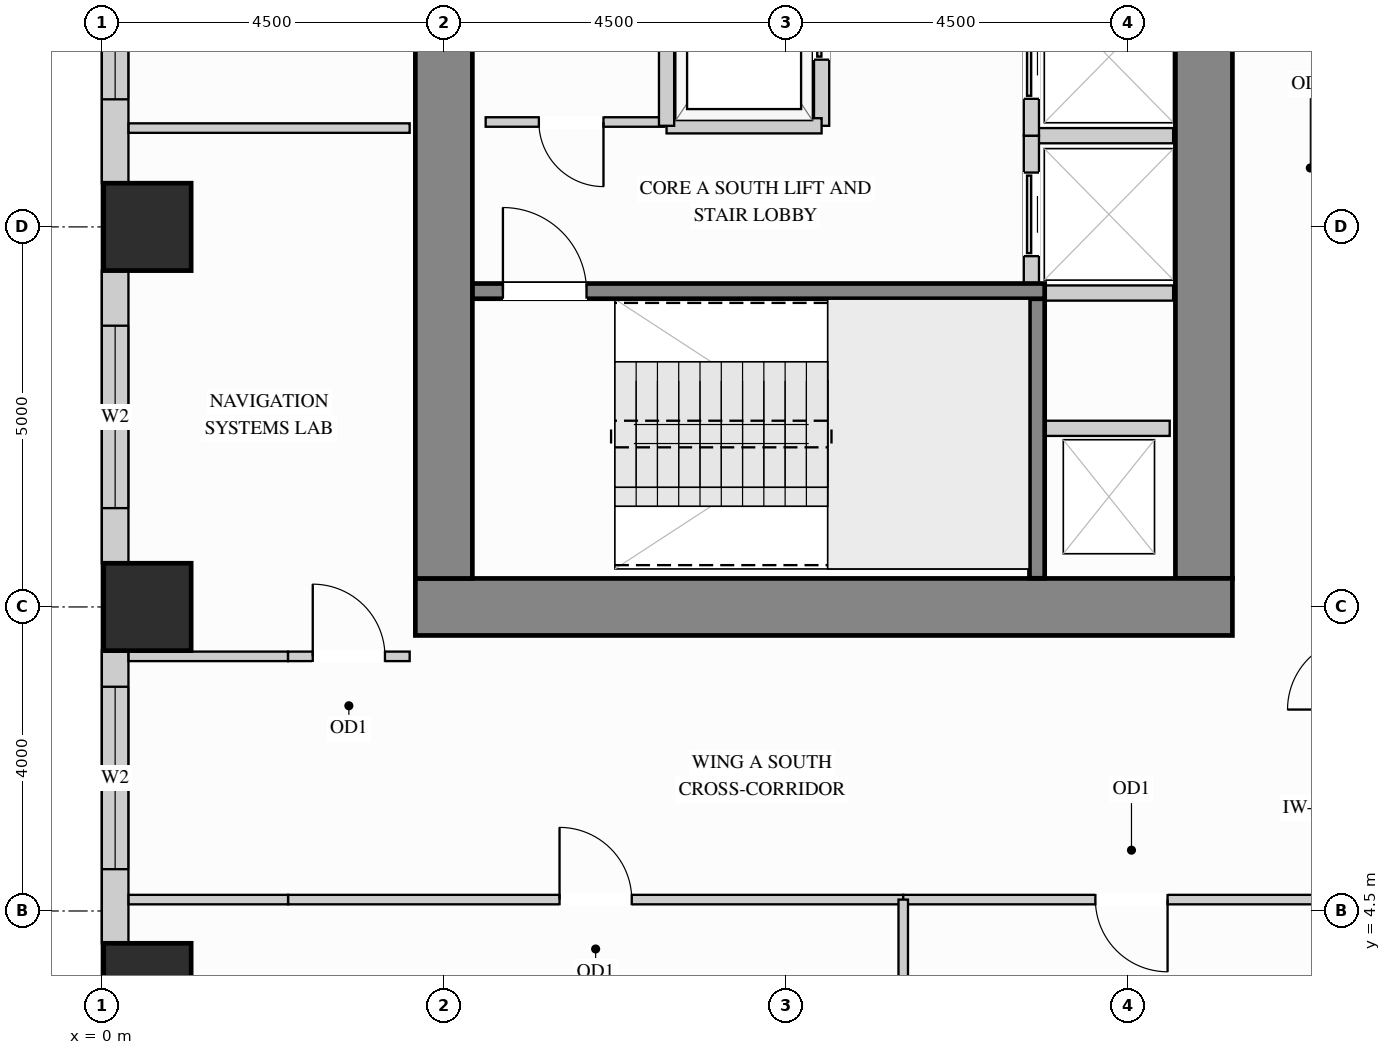
"""IFC4 building model, lengths in metres.
Left out: names, types, materials, properties, quantities, classifications, styles, units other than length and angle.
Written with IfcOpenShell. Run it as: python <this file> out.ifc"""

import sys

from ifc_helpers import new_model, si_unit, direction, frame, frame_2d, origin, origin_2d, place, context, subcontext, project, spatial, rectangle, extrude, source, transform, mapped, element, fill, save


model = new_model("IFC4")
c1 = context("Model", 3, precision=1e-05, world=origin(), true_north=direction((0.0, 1.0)))
c2 = subcontext(c1, "Body", "Model", "MODEL_VIEW")
j1 = project(units=[si_unit("LENGTHUNIT", "METRE"), si_unit("PLANEANGLEUNIT", "RADIAN")], contexts=[c1])
p1 = place(None, origin())
s1 = spatial("IfcSite", under=j1, at=p1, CompositionType="ELEMENT")
p2 = place(p1, origin())
s2 = spatial("IfcBuilding", under=s1, at=p2, CompositionType="ELEMENT")
p3 = place(p2, frame((0.0, 0.0, 102.6)))
s3 = spatial("IfcBuildingStorey", under=s2, at=p3, CompositionType="ELEMENT", Elevation=102.6)
m1 = source(origin(), c2, "Body", "SweptSolid", [
    extrude(rectangle(XDim=1.15, YDim=1.15, at=origin_2d()), origin(), (0.0, 0.0, 1.0), 3.38),
])
for number, where, z_axis, x_axis in (
    (1, (0.6, 13.5, 0.0), (0.0, 0.0, 1.0), (1.0, 0.0, 0.0)),
    (2, (0.6, 3.5, 0.0), (0.0, 0.0, 1.0), (1.0, 0.0, 0.0)),
    (3, (0.6, 8.5, 0.0), (0.0, 0.0, 1.0), (1.0, 0.0, 0.0)),
):
    element("IfcColumn", number, at=place(p3, frame(where, z_axis=z_axis, x_axis=x_axis)), inside=s3, PredefinedType="COLUMN", context=c2, shape_type="MappedRepresentation", body=[
        mapped(m1, transform((0.0, 0.0, 0.0), x_axis=(1.0, 0.0, 0.0), y_axis=(0.0, 1.0, 0.0), z_axis=(0.0, 0.0, 1.0))),
    ])
m2 = source(origin(), c2, "Body", "SweptSolid", [
    extrude(rectangle(XDim=9.945, YDim=0.75, at=frame_2d((4.973, 0.0))), origin(), (0.0, 0.0, 1.0), 3.38),
])
p4 = place(p3, frame((14.5, 8.875, 0.0), z_axis=(0.0, 0.0, 1.0), x_axis=(0.0, 1.0, 0.0)))
e4 = element("IfcWall", 4, at=p4, inside=s3, PredefinedType="SHEAR", context=c2, shape_type="MappedRepresentation", body=[
    mapped(m2, transform((0.0, 0.0, 0.0), x_axis=(1.0, 0.0, 0.0), y_axis=(0.0, 1.0, 0.0), z_axis=(0.0, 0.0, 1.0))),
])
m3 = source(origin(), c2, "Body", "SweptSolid", [
    extrude(rectangle(XDim=10.75, YDim=0.75, at=frame_2d((5.375, 0.0))), origin(), (0.0, 0.0, 1.0), 3.38),
])
p5 = place(p3, frame((4.125, 8.5, 0.0), z_axis=(0.0, 0.0, 1.0), x_axis=(1.0, 0.0, 0.0)))
e5 = element("IfcWall", 5, at=p5, inside=s3, PredefinedType="SHEAR", context=c2, shape_type="MappedRepresentation", body=[
    mapped(m3, transform((0.0, 0.0, 0.0), x_axis=(1.0, 0.0, 0.0), y_axis=(0.0, 1.0, 0.0), z_axis=(0.0, 0.0, 1.0))),
])
m4 = source(origin(), c2, "Body", "SweptSolid", [
    extrude(rectangle(XDim=20.25, YDim=0.75, at=frame_2d((10.125, 0.0))), origin(), (0.0, 0.0, 1.0), 3.38),
])
p6 = place(p3, frame((4.5, 8.875, 0.0), z_axis=(0.0, 0.0, 1.0), x_axis=(0.0, 1.0, 0.0)))
e6 = element("IfcWall", 6, at=p6, inside=s3, PredefinedType="SHEAR", context=c2, shape_type="MappedRepresentation", body=[
    mapped(m4, transform((0.0, 0.0, 0.0), x_axis=(1.0, 0.0, 0.0), y_axis=(0.0, 1.0, 0.0), z_axis=(0.0, 0.0, 1.0))),
])
p7 = place(p3, frame((0.175, 17.427, 0.0), z_axis=(0.0, 0.0, 1.0), x_axis=(0.0, -1.0, 0.0)))
e7 = element("IfcWall", 7, at=p7, inside=s3, PredefinedType="SOLIDWALL", context=c2, shape_type="SweptSolid", body=[
    extrude(rectangle(XDim=3.354, YDim=0.35, at=frame_2d((1.677, 0.0))), origin(), (0.0, 0.0, 1.0), 3.365),
])
p8 = place(p7, frame((0.448, 0.0, 0.78)))
e8 = element("IfcOpeningElement", 8, at=p8, cuts=e7, PredefinedType="OPENING", context=c2, shape_type="SweptSolid", body=[
    extrude(rectangle(XDim=1.8, YDim=2.1, at=frame_2d((0.9, 1.05))), frame((0.0, 0.185, 0.0), z_axis=(0.0, -1.0, 0.0), x_axis=(1.0, 0.0, 0.0)), (0.0, 0.0, 1.0), 0.37),
])
p9 = place(p3, frame((0.175, 12.927, 0.0), z_axis=(0.0, 0.0, 1.0), x_axis=(0.0, -1.0, 0.0)))
e9 = element("IfcWall", 9, at=p9, inside=s3, PredefinedType="SOLIDWALL", context=c2, shape_type="SweptSolid", body=[
    extrude(rectangle(XDim=3.854, YDim=0.35, at=frame_2d((1.927, 0.0))), origin(), (0.0, 0.0, 1.0), 3.365),
])
p10 = place(p9, frame((0.727, 0.0, 0.78)))
e10 = element("IfcOpeningElement", 10, at=p10, cuts=e9, PredefinedType="OPENING", context=c2, shape_type="SweptSolid", body=[
    extrude(rectangle(XDim=2.4, YDim=2.1, at=frame_2d((1.2, 1.05))), frame((0.0, 0.185, 0.0), z_axis=(0.0, -1.0, 0.0), x_axis=(1.0, 0.0, 0.0)), (0.0, 0.0, 1.0), 0.37),
])
p11 = place(p3, frame((0.175, 7.927, 0.0), z_axis=(0.0, 0.0, 1.0), x_axis=(0.0, -1.0, 0.0)))
e11 = element("IfcWall", 11, at=p11, inside=s3, PredefinedType="SOLIDWALL", context=c2, shape_type="SweptSolid", body=[
    extrude(rectangle(XDim=3.854, YDim=0.35, at=frame_2d((1.927, 0.0))), origin(), (0.0, 0.0, 1.0), 3.365),
])
p12 = place(p11, frame((0.477, 0.0, 0.78)))
e12 = element("IfcOpeningElement", 12, at=p12, cuts=e11, PredefinedType="OPENING", context=c2, shape_type="SweptSolid", body=[
    extrude(rectangle(XDim=2.4, YDim=2.1, at=frame_2d((1.2, 1.05))), frame((0.0, 0.185, 0.0), z_axis=(0.0, -1.0, 0.0), x_axis=(1.0, 0.0, 0.0)), (0.0, 0.0, 1.0), 0.37),
])
p13 = place(p3, frame((5.05, 14.88, 0.0), z_axis=(0.0, 0.0, 1.0), x_axis=(1.0, 0.0, 0.0)))
e13 = element("IfcWall", 13, at=p13, inside=s3, PredefinedType="PARTITIONING", context=c2, shape_type="SweptSolid", body=[
    extrude(rectangle(XDim=2.35, YDim=0.125, at=frame_2d((1.175, 0.0))), origin(), (0.0, 0.0, 1.0), 3.365),
])
p14 = place(p13, frame((0.7, 0.0, 0.0)))
e14 = element("IfcOpeningElement", 14, at=p14, cuts=e13, PredefinedType="OPENING", context=c2, shape_type="SweptSolid", body=[
    extrude(rectangle(XDim=0.85, YDim=2.1, at=frame_2d((0.425, 1.05))), frame((0.0, 0.073, 0.0), z_axis=(0.0, -1.0, 0.0), x_axis=(1.0, 0.0, 0.0)), (0.0, 0.0, 1.0), 0.145),
])
m5 = source(origin(), c2, "Body", "SweptSolid", [
    extrude(rectangle(XDim=2.098, YDim=0.125, at=frame_2d((1.049, 0.0))), origin(), (0.0, 0.0, 1.0), 3.365),
])
p15 = place(p3, frame((0.352, 7.85, 0.0), z_axis=(0.0, 0.0, 1.0), x_axis=(1.0, 0.0, 0.0)))
e15 = element("IfcWall", 15, at=p15, inside=s3, PredefinedType="PARTITIONING", context=c2, shape_type="MappedRepresentation", body=[
    mapped(m5, transform((0.0, 0.0, 0.0), x_axis=(1.0, 0.0, 0.0), y_axis=(0.0, 1.0, 0.0), z_axis=(0.0, 0.0, 1.0))),
])
p16 = place(p3, frame((2.45, 7.85, 0.0), z_axis=(0.0, 0.0, 1.0), x_axis=(1.0, 0.0, 0.0)))
e16 = element("IfcWall", 16, at=p16, inside=s3, PredefinedType="PARTITIONING", context=c2, shape_type="SweptSolid", body=[
    extrude(rectangle(XDim=1.6, YDim=0.125, at=frame_2d((0.8, 0.0))), origin(), (0.0, 0.0, 1.0), 3.365),
])
p17 = place(p16, frame((0.325, 0.0, 0.0)))
e17 = element("IfcOpeningElement", 17, at=p17, cuts=e16, PredefinedType="OPENING", context=c2, shape_type="SweptSolid", body=[
    extrude(rectangle(XDim=0.95, YDim=2.15, at=frame_2d((0.475, 1.075))), frame((0.0, 0.073, 0.0), z_axis=(0.0, -1.0, 0.0), x_axis=(1.0, 0.0, 0.0)), (0.0, 0.0, 1.0), 0.145),
])
p18 = place(p3, frame((2.45, 4.65, 0.0), z_axis=(0.0, 0.0, 1.0), x_axis=(1.0, 0.0, 0.0)))
e18 = element("IfcWall", 18, at=p18, inside=s3, PredefinedType="PARTITIONING", context=c2, shape_type="SweptSolid", body=[
    extrude(rectangle(XDim=8.094, YDim=0.125, at=frame_2d((4.047, 0.0))), origin(), (0.0, 0.0, 1.0), 2.828),
])
p19 = place(p18, frame((3.572, 0.0, 0.0)))
e19 = element("IfcOpeningElement", 19, at=p19, cuts=e18, PredefinedType="OPENING", context=c2, shape_type="SweptSolid", body=[
    extrude(rectangle(XDim=0.95, YDim=2.15, at=frame_2d((0.475, 1.075))), frame((0.0, 0.073, 0.0), z_axis=(0.0, -1.0, 0.0), x_axis=(1.0, 0.0, 0.0)), (0.0, 0.0, 1.0), 0.145),
])
p20 = place(p3, frame((10.544, 4.65, 0.0), z_axis=(0.0, 0.0, 1.0), x_axis=(1.0, 0.0, 0.0)))
e20 = element("IfcWall", 20, at=p20, inside=s3, PredefinedType="PARTITIONING", context=c2, shape_type="SweptSolid", body=[
    extrude(rectangle(XDim=6.006, YDim=0.125, at=frame_2d((3.003, 0.0))), origin(), (0.0, 0.0, 1.0), 2.828),
])
p21 = place(p20, frame((2.528, 0.0, 0.0)))
e21 = element("IfcOpeningElement", 21, at=p21, cuts=e20, PredefinedType="OPENING", context=c2, shape_type="SweptSolid", body=[
    extrude(rectangle(XDim=0.95, YDim=2.15, at=frame_2d((0.475, 1.075))), frame((0.0, 0.073, 0.0), z_axis=(0.0, -1.0, 0.0), x_axis=(1.0, 0.0, 0.0)), (0.0, 0.0, 1.0), 0.145),
])
m6 = source(origin(), c2, "Body", "SweptSolid", [
    extrude(rectangle(XDim=2.098, YDim=0.125, at=frame_2d((1.049, 0.0))), origin(), (0.0, 0.0, 1.0), 2.828),
])
p22 = place(p3, frame((0.352, 4.65, 0.0), z_axis=(0.0, 0.0, 1.0), x_axis=(1.0, 0.0, 0.0)))
e22 = element("IfcWall", 22, at=p22, inside=s3, PredefinedType="PARTITIONING", context=c2, shape_type="MappedRepresentation", body=[
    mapped(m6, transform((0.0, 0.0, 0.0), x_axis=(1.0, 0.0, 0.0), y_axis=(0.0, 1.0, 0.0), z_axis=(0.0, 0.0, 1.0))),
])
m7 = source(origin(), c2, "Body", "SweptSolid", [
    extrude(rectangle(XDim=4.298, YDim=0.125, at=frame_2d((2.149, 0.0))), origin(), (0.0, 0.0, 1.0), 3.365),
])
p23 = place(p3, frame((10.544, 0.352, 0.0), z_axis=(0.0, 0.0, 1.0), x_axis=(0.0, 1.0, 0.0)))
e23 = element("IfcWall", 23, at=p23, inside=s3, PredefinedType="PARTITIONING", context=c2, shape_type="MappedRepresentation", body=[
    mapped(m7, transform((0.0, 0.0, 0.0), x_axis=(1.0, 0.0, 0.0), y_axis=(0.0, 1.0, 0.0), z_axis=(0.0, 0.0, 1.0))),
])
m8 = source(origin(), c2, "Body", "SweptSolid", [
    extrude(rectangle(XDim=3.698, YDim=0.125, at=frame_2d((1.849, 0.0))), origin(), (0.0, 0.0, 1.0), 3.365),
])
p24 = place(p3, frame((0.352, 14.8, 0.0), z_axis=(0.0, 0.0, 1.0), x_axis=(1.0, 0.0, 0.0)))
e24 = element("IfcWall", 24, at=p24, inside=s3, PredefinedType="PARTITIONING", context=c2, shape_type="MappedRepresentation", body=[
    mapped(m8, transform((0.0, 0.0, 0.0), x_axis=(1.0, 0.0, 0.0), y_axis=(0.0, 1.0, 0.0), z_axis=(0.0, 0.0, 1.0))),
])
m9 = source(origin(), c2, "Body", "SweptSolid", [
    extrude(rectangle(XDim=1.63, YDim=0.2, at=frame_2d((0.815, 0.0))), origin(), (0.0, 0.0, 1.0), 3.365),
])
p25 = place(p3, frame((12.42, 10.85, 0.0), z_axis=(0.0, 0.0, 1.0), x_axis=(1.0, 0.0, 0.0)))
e25 = element("IfcWall", 25, at=p25, inside=s3, PredefinedType="PARTITIONING", context=c2, shape_type="MappedRepresentation", body=[
    mapped(m9, transform((0.0, 0.0, 0.0), x_axis=(1.0, 0.0, 0.0), y_axis=(0.0, 1.0, 0.0), z_axis=(0.0, 0.0, 1.0))),
])
m10 = source(origin(), c2, "Body", "SweptSolid", [
    extrude(rectangle(XDim=1.865, YDim=0.2, at=frame_2d((0.933, 0.0))), origin(), (0.0, 0.0, 1.0), 3.365),
])
for number, where, z_axis, x_axis in (
    (26, (12.23, 14.7, 0.0), (0.0, 0.0, 1.0), (1.0, 0.0, 0.0)),
    (27, (12.23, 12.63, 0.0), (0.0, 0.0, 1.0), (1.0, 0.0, 0.0)),
):
    element("IfcWall", number, at=place(p3, frame(where, z_axis=z_axis, x_axis=x_axis)), inside=s3, PredefinedType="PARTITIONING", context=c2, shape_type="MappedRepresentation", body=[
        mapped(m10, transform((0.0, 0.0, 0.0), x_axis=(1.0, 0.0, 0.0), y_axis=(0.0, 1.0, 0.0), z_axis=(0.0, 0.0, 1.0))),
    ])
p26 = place(p3, frame((12.23, 12.63, 0.0), z_axis=(0.0, 0.0, 1.0), x_axis=(0.0, 1.0, 0.0)))
e28 = element("IfcWall", 28, at=p26, inside=s3, PredefinedType="PARTITIONING", context=c2, shape_type="SweptSolid", body=[
    extrude(rectangle(XDim=2.07, YDim=0.2, at=frame_2d((1.035, 0.0))), origin(), (0.0, 0.0, 1.0), 3.365),
])
p27 = place(p26, frame((0.485, 0.0, 0.0)))
e29 = element("IfcOpeningElement", 29, at=p27, cuts=e28, PredefinedType="OPENING", context=c2, shape_type="SweptSolid", body=[
    extrude(rectangle(XDim=1.1, YDim=2.2, at=frame_2d((0.55, 1.1))), frame((0.0, 0.11, 0.0), z_axis=(0.0, -1.0, 0.0), x_axis=(1.0, 0.0, 0.0)), (0.0, 0.0, 1.0), 0.22),
])
p28 = place(p3, frame((12.23, 14.7, 0.0), z_axis=(0.0, 0.0, 1.0), x_axis=(0.0, 1.0, 0.0)))
e30 = element("IfcWall", 30, at=p28, inside=s3, PredefinedType="PARTITIONING", context=c2, shape_type="SweptSolid", body=[
    extrude(rectangle(XDim=2.07, YDim=0.2, at=frame_2d((1.035, 0.0))), origin(), (0.0, 0.0, 1.0), 3.365),
])
p29 = place(p28, frame((0.485, 0.0, 0.0)))
e31 = element("IfcOpeningElement", 31, at=p29, cuts=e30, PredefinedType="OPENING", context=c2, shape_type="SweptSolid", body=[
    extrude(rectangle(XDim=1.1, YDim=2.2, at=frame_2d((0.55, 1.1))), frame((0.0, 0.11, 0.0), z_axis=(0.0, -1.0, 0.0), x_axis=(1.0, 0.0, 0.0)), (0.0, 0.0, 1.0), 0.22),
])
p30 = place(p3, frame((9.47, 14.83, 0.0), z_axis=(0.0, 0.0, 1.0), x_axis=(0.0, 1.0, 0.0)))
e32 = element("IfcWall", 32, at=p30, inside=s3, PredefinedType="PARTITIONING", context=c2, shape_type="SweptSolid", body=[
    extrude(rectangle(XDim=2.84, YDim=0.2, at=frame_2d((1.42, 0.0))), origin(), (0.0, 0.0, 1.0), 3.365),
])
p31 = place(p30, frame((0.87, 0.0, 0.0)))
e33 = element("IfcOpeningElement", 33, at=p31, cuts=e32, PredefinedType="OPENING", context=c2, shape_type="SweptSolid", body=[
    extrude(rectangle(XDim=1.1, YDim=2.2, at=frame_2d((0.55, 1.1))), frame((0.0, 0.11, 0.0), z_axis=(0.0, -1.0, 0.0), x_axis=(1.0, 0.0, 0.0)), (0.0, 0.0, 1.0), 0.22),
])
m11 = source(origin(), c2, "Body", "SweptSolid", [
    extrude(rectangle(XDim=2.04, YDim=0.2, at=frame_2d((1.02, 0.0))), origin(), (0.0, 0.0, 1.0), 3.365),
])
p32 = place(p3, frame((7.43, 14.83, 0.0), z_axis=(0.0, 0.0, 1.0), x_axis=(1.0, 0.0, 0.0)))
e34 = element("IfcWall", 34, at=p32, inside=s3, PredefinedType="PARTITIONING", context=c2, shape_type="MappedRepresentation", body=[
    mapped(m11, transform((0.0, 0.0, 0.0), x_axis=(1.0, 0.0, 0.0), y_axis=(0.0, 1.0, 0.0), z_axis=(0.0, 0.0, 1.0))),
])
m12 = source(origin(), c2, "Body", "SweptSolid", [
    extrude(rectangle(XDim=2.84, YDim=0.2, at=frame_2d((1.42, 0.0))), origin(), (0.0, 0.0, 1.0), 3.365),
])
p33 = place(p3, frame((7.43, 14.83, 0.0), z_axis=(0.0, 0.0, 1.0), x_axis=(0.0, 1.0, 0.0)))
e35 = element("IfcWall", 35, at=p33, inside=s3, PredefinedType="PARTITIONING", context=c2, shape_type="MappedRepresentation", body=[
    mapped(m12, transform((0.0, 0.0, 0.0), x_axis=(1.0, 0.0, 0.0), y_axis=(0.0, 1.0, 0.0), z_axis=(0.0, 0.0, 1.0))),
])
m13 = source(origin(), c2, "Body", "SweptSolid", [
    extrude(rectangle(XDim=3.678, YDim=0.2, at=frame_2d((1.839, 0.0))), origin(), (0.0, 0.0, 1.0), 3.38),
])
p34 = place(p3, frame((12.305, 8.877, 0.0), z_axis=(0.0, 0.0, 1.0), x_axis=(0.0, 1.0, 0.0)))
e36 = element("IfcWall", 36, at=p34, inside=s3, PredefinedType="SHEAR", context=c2, shape_type="MappedRepresentation", body=[
    mapped(m13, transform((0.0, 0.0, 0.0), x_axis=(1.0, 0.0, 0.0), y_axis=(0.0, 1.0, 0.0), z_axis=(0.0, 0.0, 1.0))),
])
p35 = place(p3, frame((4.877, 12.655, 0.0), z_axis=(0.0, 0.0, 1.0), x_axis=(1.0, 0.0, 0.0)))
e37 = element("IfcWall", 37, at=p35, inside=s3, PredefinedType="SHEAR", context=c2, shape_type="SweptSolid", body=[
    extrude(rectangle(XDim=7.528, YDim=0.2, at=frame_2d((3.764, 0.0))), origin(), (0.0, 0.0, 1.0), 3.38),
])
p36 = place(p35, frame((0.4, 0.0, 0.0)))
e38 = element("IfcOpeningElement", 38, at=p36, cuts=e37, PredefinedType="OPENING", context=c2, shape_type="SweptSolid", body=[
    extrude(rectangle(XDim=1.1, YDim=2.15, at=frame_2d((0.55, 1.075))), frame((0.0, 0.11, 0.0), z_axis=(0.0, -1.0, 0.0), x_axis=(1.0, 0.0, 0.0)), (0.0, 0.0, 1.0), 0.22),
])
m14 = source(origin(), c2, "Body", "SweptSolid", [
    extrude(rectangle(XDim=1.1, YDim=2.2, at=frame_2d((0.55, 1.1))), frame((0.0, 0.025, 0.0), z_axis=(0.0, -1.0, 0.0), x_axis=(1.0, 0.0, 0.0)), (0.0, 0.0, 1.0), 0.05),
])
p37 = place(p27, origin())
e39 = element("IfcDoor", 39, at=p37, inside=s3, OperationType="SLIDING_TO_LEFT", PredefinedType="DOOR", context=c2, shape_type="MappedRepresentation", body=[
    mapped(m14, transform((0.0, 0.0, 0.0), x_axis=(1.0, 0.0, 0.0), y_axis=(0.0, 1.0, 0.0), z_axis=(0.0, 0.0, 1.0))),
])
fill(e29, e39)
p38 = place(p29, origin())
e40 = element("IfcDoor", 40, at=p38, inside=s3, OperationType="SLIDING_TO_LEFT", PredefinedType="DOOR", context=c2, shape_type="MappedRepresentation", body=[
    mapped(m14, transform((0.0, 0.0, 0.0), x_axis=(1.0, 0.0, 0.0), y_axis=(0.0, 1.0, 0.0), z_axis=(0.0, 0.0, 1.0))),
])
fill(e31, e40)
p39 = place(p31, origin())
e41 = element("IfcDoor", 41, at=p39, inside=s3, OperationType="SLIDING_TO_LEFT", PredefinedType="DOOR", context=c2, shape_type="MappedRepresentation", body=[
    mapped(m14, transform((0.0, 0.0, 0.0), x_axis=(1.0, 0.0, 0.0), y_axis=(0.0, 1.0, 0.0), z_axis=(0.0, 0.0, 1.0))),
])
fill(e33, e41)
m15 = source(origin(), c2, "Body", "SweptSolid", [
    extrude(rectangle(XDim=0.95, YDim=2.15, at=frame_2d((0.475, 1.075))), frame((0.0, 0.025, 0.0), z_axis=(0.0, -1.0, 0.0), x_axis=(1.0, 0.0, 0.0)), (0.0, 0.0, 1.0), 0.05),
])
p40 = place(p19, origin())
e42 = element("IfcDoor", 42, at=p40, inside=s3, OperationType="SINGLE_SWING_LEFT", PredefinedType="DOOR", context=c2, shape_type="MappedRepresentation", body=[
    mapped(m15, transform((0.0, 0.0, 0.0), x_axis=(1.0, 0.0, 0.0), y_axis=(0.0, 1.0, 0.0), z_axis=(0.0, 0.0, 1.0))),
])
fill(e19, e42)
p41 = place(p21, origin())
e43 = element("IfcDoor", 43, at=p41, inside=s3, OperationType="SINGLE_SWING_RIGHT", PredefinedType="DOOR", context=c2, shape_type="MappedRepresentation", body=[
    mapped(m15, transform((0.0, 0.0, 0.0), x_axis=(1.0, 0.0, 0.0), y_axis=(0.0, 1.0, 0.0), z_axis=(0.0, 0.0, 1.0))),
])
fill(e21, e43)
p42 = place(p17, origin())
e44 = element("IfcDoor", 44, at=p42, inside=s3, OperationType="SINGLE_SWING_LEFT", PredefinedType="DOOR", context=c2, shape_type="MappedRepresentation", body=[
    mapped(m15, transform((0.0, 0.0, 0.0), x_axis=(1.0, 0.0, 0.0), y_axis=(0.0, 1.0, 0.0), z_axis=(0.0, 0.0, 1.0))),
])
fill(e17, e44)
m16 = source(origin(), c2, "Body", "SweptSolid", [
    extrude(rectangle(XDim=0.85, YDim=2.1, at=frame_2d((0.425, 1.05))), frame((0.0, 0.025, 0.0), z_axis=(0.0, -1.0, 0.0), x_axis=(1.0, 0.0, 0.0)), (0.0, 0.0, 1.0), 0.05),
])
p43 = place(p14, origin())
e45 = element("IfcDoor", 45, at=p43, inside=s3, OperationType="SINGLE_SWING_RIGHT", PredefinedType="DOOR", context=c2, shape_type="MappedRepresentation", body=[
    mapped(m16, transform((0.0, 0.0, 0.0), x_axis=(1.0, 0.0, 0.0), y_axis=(0.0, 1.0, 0.0), z_axis=(0.0, 0.0, 1.0))),
])
fill(e14, e45)
m17 = source(origin(), c2, "Body", "SweptSolid", [
    extrude(rectangle(XDim=1.1, YDim=2.15, at=frame_2d((0.55, 1.075))), frame((0.0, 0.025, 0.0), z_axis=(0.0, -1.0, 0.0), x_axis=(1.0, 0.0, 0.0)), (0.0, 0.0, 1.0), 0.05),
])
p44 = place(p36, origin())
e46 = element("IfcDoor", 46, at=p44, inside=s3, OperationType="SINGLE_SWING_LEFT", PredefinedType="DOOR", context=c2, shape_type="MappedRepresentation", body=[
    mapped(m17, transform((0.0, 0.0, 0.0), x_axis=(1.0, 0.0, 0.0), y_axis=(0.0, 1.0, 0.0), z_axis=(0.0, 0.0, 1.0))),
])
fill(e38, e46)
m18 = source(origin(), c2, "Body", "SweptSolid", [
    extrude(rectangle(XDim=1.8, YDim=2.1, at=frame_2d((0.9, 1.05))), frame((0.0, 0.03, 0.0), z_axis=(0.0, -1.0, 0.0), x_axis=(1.0, 0.0, 0.0)), (0.0, 0.0, 1.0), 0.06),
])
p45 = place(p8, origin())
e47 = element("IfcWindow", 47, at=p45, inside=s3, PartitioningType="SINGLE_PANEL", PredefinedType="WINDOW", context=c2, shape_type="MappedRepresentation", body=[
    mapped(m18, transform((0.0, 0.0, 0.0), x_axis=(1.0, 0.0, 0.0), y_axis=(0.0, 1.0, 0.0), z_axis=(0.0, 0.0, 1.0))),
])
fill(e8, e47)
m19 = source(origin(), c2, "Body", "SweptSolid", [
    extrude(rectangle(XDim=2.4, YDim=2.1, at=frame_2d((1.2, 1.05))), frame((0.0, 0.03, 0.0), z_axis=(0.0, -1.0, 0.0), x_axis=(1.0, 0.0, 0.0)), (0.0, 0.0, 1.0), 0.06),
])
p46 = place(p10, origin())
e48 = element("IfcWindow", 48, at=p46, inside=s3, PartitioningType="SINGLE_PANEL", PredefinedType="WINDOW", context=c2, shape_type="MappedRepresentation", body=[
    mapped(m19, transform((0.0, 0.0, 0.0), x_axis=(1.0, 0.0, 0.0), y_axis=(0.0, 1.0, 0.0), z_axis=(0.0, 0.0, 1.0))),
])
fill(e10, e48)
p47 = place(p12, origin())
e49 = element("IfcWindow", 49, at=p47, inside=s3, PartitioningType="SINGLE_PANEL", PredefinedType="WINDOW", context=c2, shape_type="MappedRepresentation", body=[
    mapped(m19, transform((0.0, 0.0, 0.0), x_axis=(1.0, 0.0, 0.0), y_axis=(0.0, 1.0, 0.0), z_axis=(0.0, 0.0, 1.0))),
])
fill(e12, e49)
save(model, sys.argv[1])
